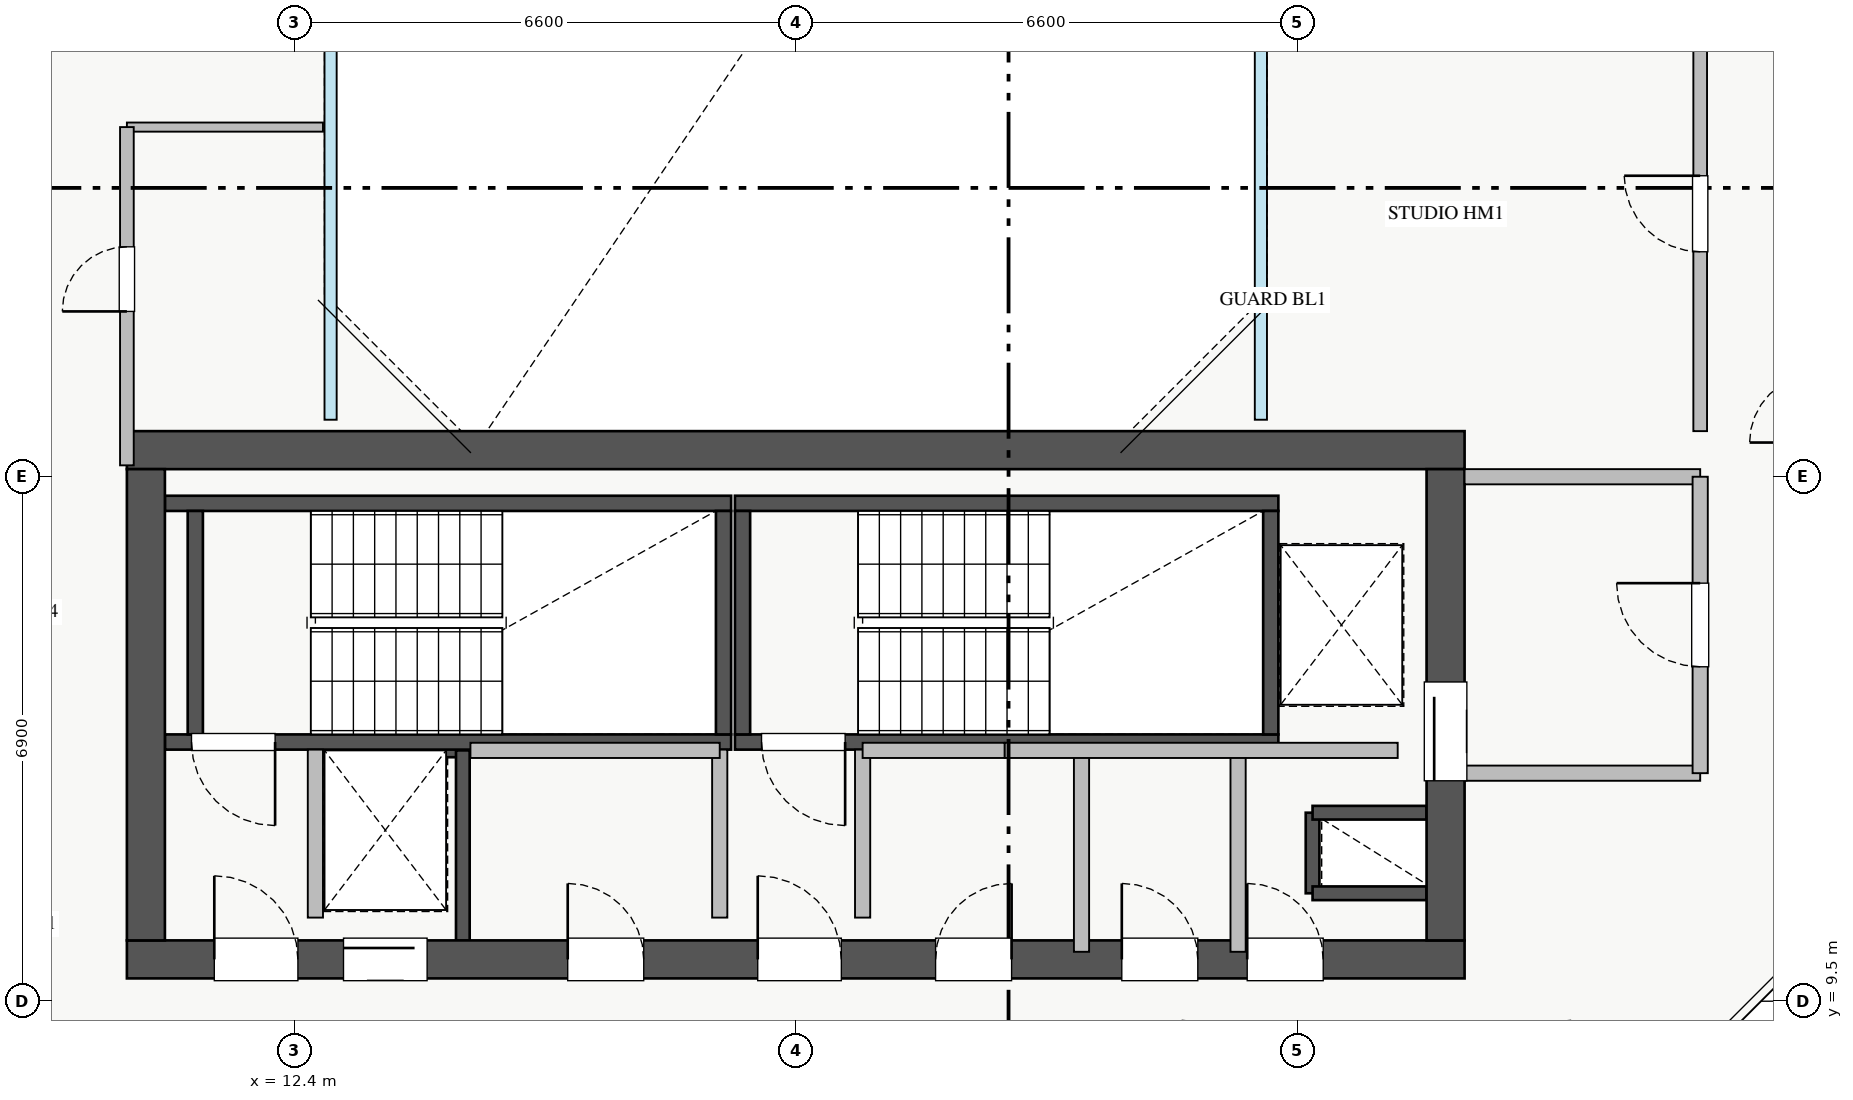
"""IFC4 building model, lengths in metres.
Left out: names, types, materials, properties, quantities, classifications, styles, units other than length and angle.
Written with IfcOpenShell. Run it as: python <this file> out.ifc"""

import sys

from ifc_helpers import new_model, si_unit, direction, frame, frame_2d, origin, place, context, subcontext, project, spatial, rectangle, extrude, source, transform, mapped, element, fill, save


model = new_model("IFC4")
c1 = context("Model", 3, precision=1e-05, world=origin(), true_north=direction((0.0, 1.0)))
c2 = subcontext(c1, "Body", "Model", "MODEL_VIEW")
j1 = project(units=[si_unit("LENGTHUNIT", "METRE"), si_unit("PLANEANGLEUNIT", "RADIAN")], contexts=[c1])
p1 = place(None, origin())
s1 = spatial("IfcSite", under=j1, at=p1, CompositionType="ELEMENT")
p2 = place(p1, origin())
s2 = spatial("IfcBuilding", under=s1, at=p2, CompositionType="ELEMENT")
p3 = place(p2, frame((0.0, 0.0, 190.5)))
s3 = spatial("IfcBuildingStorey", under=s2, at=p3, CompositionType="ELEMENT", Elevation=190.5)
p4 = place(p3, frame((12.68, 12.8, 0.0), z_axis=(0.0, 0.0, 1.0), x_axis=(1.0, 0.0, 0.0)))
e1 = element("IfcWall", 1, at=p4, inside=s3, PredefinedType="SHEAR", context=c2, shape_type="SweptSolid", body=[
    extrude(rectangle(XDim=1.94, YDim=0.18, at=frame_2d((0.97, 0.0))), origin(), (0.0, 0.0, 1.0), 3.07),
])
p5 = place(p3, frame((14.62, 10.3, 0.0), z_axis=(0.0, 0.0, 1.0), x_axis=(0.0, 1.0, 0.0)))
e2 = element("IfcWall", 2, at=p5, inside=s3, PredefinedType="SHEAR", context=c2, shape_type="SweptSolid", body=[
    extrude(rectangle(XDim=2.5, YDim=0.18, at=frame_2d((1.25, 0.0))), origin(), (0.0, 0.0, 1.0), 3.07),
])
p6 = place(p3, frame((25.8, 10.92, 0.0), z_axis=(0.0, 0.0, 1.0), x_axis=(0.0, 1.0, 0.0)))
e3 = element("IfcWall", 3, at=p6, inside=s3, PredefinedType="SHEAR", context=c2, shape_type="SweptSolid", body=[
    extrude(rectangle(XDim=1.06, YDim=0.18, at=frame_2d((0.53, 0.0))), origin(), (0.0, 0.0, 1.0), 3.07),
])
for number, where, z_axis, x_axis in (
    (4, (25.8, 11.98, 0.0), (0.0, 0.0, 1.0), (1.0, 0.0, 0.0)),
    (5, (25.8, 10.92, 0.0), (0.0, 0.0, 1.0), (1.0, 0.0, 0.0)),
):
    element("IfcWall", number, at=place(p3, frame(where, z_axis=z_axis, x_axis=x_axis)), inside=s3, PredefinedType="SHEAR", context=c2, shape_type="SweptSolid", body=[
        extrude(rectangle(XDim=1.5, YDim=0.18, at=frame_2d((0.75, 0.0))), origin(), (0.0, 0.0, 1.0), 3.07),
    ])
p7 = place(p3, frame((10.7, 12.91, 0.0), z_axis=(0.0, 0.0, 1.0), x_axis=(1.0, 0.0, 0.0)))
e6 = element("IfcWall", 6, at=p7, inside=s3, PredefinedType="SHEAR", context=c2, shape_type="SweptSolid", body=[
    extrude(rectangle(XDim=7.45, YDim=0.2, at=frame_2d((3.725, 0.0))), origin(), (0.0, 0.0, 1.0), 3.25),
])
p8 = place(p7, frame((0.35, 0.0, 0.0)))
e7 = element("IfcOpeningElement", 7, at=p8, cuts=e6, PredefinedType="OPENING", context=c2, shape_type="SweptSolid", body=[
    extrude(rectangle(XDim=1.1, YDim=2.05, at=frame_2d((0.55, 1.025))), frame((0.0, 0.11, 0.0), z_axis=(0.0, -1.0, 0.0), x_axis=(1.0, 0.0, 0.0)), (0.0, 0.0, 1.0), 0.22),
])
p9 = place(p3, frame((10.7, 16.05, 0.0), z_axis=(0.0, 0.0, 1.0), x_axis=(1.0, 0.0, 0.0)))
e8 = element("IfcWall", 8, at=p9, inside=s3, PredefinedType="SHEAR", context=c2, shape_type="SweptSolid", body=[
    extrude(rectangle(XDim=7.45, YDim=0.2, at=frame_2d((3.725, 0.0))), origin(), (0.0, 0.0, 1.0), 3.25),
])
for number, where, z_axis, x_axis in (
    (9, (11.1, 13.01, 0.0), (0.0, 0.0, 1.0), (0.0, 1.0, 0.0)),
    (10, (18.05, 13.01, 0.0), (0.0, 0.0, 1.0), (0.0, 1.0, 0.0)),
):
    element("IfcWall", number, at=place(p3, frame(where, z_axis=z_axis, x_axis=x_axis)), inside=s3, PredefinedType="SHEAR", context=c2, shape_type="SweptSolid", body=[
        extrude(rectangle(XDim=2.94, YDim=0.2, at=frame_2d((1.47, 0.0))), origin(), (0.0, 0.0, 1.0), 3.25),
    ])
p10 = place(p3, frame((18.2, 12.91, 0.0), z_axis=(0.0, 0.0, 1.0), x_axis=(1.0, 0.0, 0.0)))
e11 = element("IfcWall", 11, at=p10, inside=s3, PredefinedType="SHEAR", context=c2, shape_type="SweptSolid", body=[
    extrude(rectangle(XDim=7.15, YDim=0.2, at=frame_2d((3.575, 0.0))), origin(), (0.0, 0.0, 1.0), 3.25),
])
p11 = place(p10, frame((0.35, 0.0, 0.0)))
e12 = element("IfcOpeningElement", 12, at=p11, cuts=e11, PredefinedType="OPENING", context=c2, shape_type="SweptSolid", body=[
    extrude(rectangle(XDim=1.1, YDim=2.05, at=frame_2d((0.55, 1.025))), frame((0.0, 0.11, 0.0), z_axis=(0.0, -1.0, 0.0), x_axis=(1.0, 0.0, 0.0)), (0.0, 0.0, 1.0), 0.22),
])
p12 = place(p3, frame((18.2, 16.05, 0.0), z_axis=(0.0, 0.0, 1.0), x_axis=(1.0, 0.0, 0.0)))
e13 = element("IfcWall", 13, at=p12, inside=s3, PredefinedType="SHEAR", context=c2, shape_type="SweptSolid", body=[
    extrude(rectangle(XDim=7.15, YDim=0.2, at=frame_2d((3.575, 0.0))), origin(), (0.0, 0.0, 1.0), 3.25),
])
for number, where, z_axis, x_axis in (
    (14, (18.3, 13.01, 0.0), (0.0, 0.0, 1.0), (0.0, 1.0, 0.0)),
    (15, (25.25, 13.01, 0.0), (0.0, 0.0, 1.0), (0.0, 1.0, 0.0)),
):
    element("IfcWall", number, at=place(p3, frame(where, z_axis=z_axis, x_axis=x_axis)), inside=s3, PredefinedType="SHEAR", context=c2, shape_type="SweptSolid", body=[
        extrude(rectangle(XDim=2.94, YDim=0.2, at=frame_2d((1.47, 0.0))), origin(), (0.0, 0.0, 1.0), 3.25),
    ])
p13 = place(p3, frame((10.2, 10.05, 0.0), z_axis=(0.0, 0.0, 1.0), x_axis=(1.0, 0.0, 0.0)))
e16 = element("IfcWall", 16, at=p13, inside=s3, PredefinedType="SHEAR", context=c2, shape_type="SweptSolid", body=[
    extrude(rectangle(XDim=17.6, YDim=0.5, at=frame_2d((8.8, 0.0))), origin(), (0.0, 0.0, 1.0), 3.25),
])
p14 = place(p13, frame((1.15, 0.0, 0.0)))
e17 = element("IfcOpeningElement", 17, at=p14, cuts=e16, PredefinedType="OPENING", context=c2, shape_type="SweptSolid", body=[
    extrude(rectangle(XDim=1.1, YDim=2.05, at=frame_2d((0.55, 1.025))), frame((0.0, 0.26, 0.0), z_axis=(0.0, -1.0, 0.0), x_axis=(1.0, 0.0, 0.0)), (0.0, 0.0, 1.0), 0.52),
])
p15 = place(p13, frame((8.3, 0.0, 0.0)))
e18 = element("IfcOpeningElement", 18, at=p15, cuts=e16, PredefinedType="OPENING", context=c2, shape_type="SweptSolid", body=[
    extrude(rectangle(XDim=1.1, YDim=2.05, at=frame_2d((0.55, 1.025))), frame((0.0, 0.26, 0.0), z_axis=(0.0, -1.0, 0.0), x_axis=(1.0, 0.0, 0.0)), (0.0, 0.0, 1.0), 0.52),
])
p16 = place(p13, frame((2.85, 0.0, 0.0)))
e19 = element("IfcOpeningElement", 19, at=p16, cuts=e16, PredefinedType="OPENING", context=c2, shape_type="SweptSolid", body=[
    extrude(rectangle(XDim=1.1, YDim=2.05, at=frame_2d((0.55, 1.025))), frame((0.0, 0.26, 0.0), z_axis=(0.0, -1.0, 0.0), x_axis=(1.0, 0.0, 0.0)), (0.0, 0.0, 1.0), 0.52),
])
p17 = place(p13, frame((5.8, 0.0, 0.0)))
e20 = element("IfcOpeningElement", 20, at=p17, cuts=e16, PredefinedType="OPENING", context=c2, shape_type="SweptSolid", body=[
    extrude(rectangle(XDim=1.0, YDim=2.05, at=frame_2d((0.5, 1.025))), frame((0.0, 0.26, 0.0), z_axis=(0.0, -1.0, 0.0), x_axis=(1.0, 0.0, 0.0)), (0.0, 0.0, 1.0), 0.52),
])
p18 = place(p13, frame((14.74, 0.0, 0.0)))
e21 = element("IfcOpeningElement", 21, at=p18, cuts=e16, PredefinedType="OPENING", context=c2, shape_type="SweptSolid", body=[
    extrude(rectangle(XDim=1.0, YDim=2.05, at=frame_2d((0.5, 1.025))), frame((0.0, 0.26, 0.0), z_axis=(0.0, -1.0, 0.0), x_axis=(1.0, 0.0, 0.0)), (0.0, 0.0, 1.0), 0.52),
])
p19 = place(p13, frame((10.64, 0.0, 0.0)))
e22 = element("IfcOpeningElement", 22, at=p19, cuts=e16, PredefinedType="OPENING", context=c2, shape_type="SweptSolid", body=[
    extrude(rectangle(XDim=1.0, YDim=2.05, at=frame_2d((0.5, 1.025))), frame((0.0, 0.26, 0.0), z_axis=(0.0, -1.0, 0.0), x_axis=(1.0, 0.0, 0.0)), (0.0, 0.0, 1.0), 0.52),
])
p20 = place(p13, frame((13.09, 0.0, 0.0)))
e23 = element("IfcOpeningElement", 23, at=p20, cuts=e16, PredefinedType="OPENING", context=c2, shape_type="SweptSolid", body=[
    extrude(rectangle(XDim=1.0, YDim=2.05, at=frame_2d((0.5, 1.025))), frame((0.0, 0.26, 0.0), z_axis=(0.0, -1.0, 0.0), x_axis=(1.0, 0.0, 0.0)), (0.0, 0.0, 1.0), 0.52),
])
p21 = place(p3, frame((10.2, 16.75, 0.0), z_axis=(0.0, 0.0, 1.0), x_axis=(1.0, 0.0, 0.0)))
e24 = element("IfcWall", 24, at=p21, inside=s3, PredefinedType="SHEAR", context=c2, shape_type="SweptSolid", body=[
    extrude(rectangle(XDim=17.6, YDim=0.5, at=frame_2d((8.8, 0.0))), origin(), (0.0, 0.0, 1.0), 3.25),
])
p22 = place(p3, frame((10.45, 10.3, 0.0), z_axis=(0.0, 0.0, 1.0), x_axis=(0.0, 1.0, 0.0)))
e25 = element("IfcWall", 25, at=p22, inside=s3, PredefinedType="SHEAR", context=c2, shape_type="SweptSolid", body=[
    extrude(rectangle(XDim=6.2, YDim=0.5, at=frame_2d((3.1, 0.0))), origin(), (0.0, 0.0, 1.0), 3.25),
])
p23 = place(p3, frame((27.55, 10.3, 0.0), z_axis=(0.0, 0.0, 1.0), x_axis=(0.0, 1.0, 0.0)))
e26 = element("IfcWall", 26, at=p23, inside=s3, PredefinedType="SHEAR", context=c2, shape_type="SweptSolid", body=[
    extrude(rectangle(XDim=6.2, YDim=0.5, at=frame_2d((3.1, 0.0))), origin(), (0.0, 0.0, 1.0), 3.25),
])
p24 = place(p23, frame((2.1, 0.0, 0.0)))
e27 = element("IfcOpeningElement", 27, at=p24, cuts=e26, PredefinedType="OPENING", context=c2, shape_type="SweptSolid", body=[
    extrude(rectangle(XDim=1.3, YDim=2.05, at=frame_2d((0.65, 1.025))), frame((0.0, 0.26, 0.0), z_axis=(0.0, -1.0, 0.0), x_axis=(1.0, 0.0, 0.0)), (0.0, 0.0, 1.0), 0.52),
])
p25 = place(p3, frame((27.8, 16.4, 0.0), z_axis=(0.0, 0.0, 1.0), x_axis=(1.0, 0.0, 0.0)))
e28 = element("IfcWall", 28, at=p25, inside=s3, PredefinedType="PARTITIONING", context=c2, shape_type="SweptSolid", body=[
    extrude(rectangle(XDim=3.1, YDim=0.2, at=frame_2d((1.55, 0.0))), origin(), (0.0, 0.0, 1.0), 3.07),
])
p26 = place(p3, frame((27.8, 12.5, 0.0), z_axis=(0.0, 0.0, 1.0), x_axis=(1.0, 0.0, 0.0)))
e29 = element("IfcWall", 29, at=p26, inside=s3, PredefinedType="PARTITIONING", context=c2, shape_type="SweptSolid", body=[
    extrude(rectangle(XDim=3.1, YDim=0.2, at=frame_2d((1.55, 0.0))), origin(), (0.0, 0.0, 1.0), 2.265),
])
p27 = place(p3, frame((30.9, 12.5, 0.0), z_axis=(0.0, 0.0, 1.0), x_axis=(0.0, 1.0, 0.0)))
e30 = element("IfcWall", 30, at=p27, inside=s3, PredefinedType="PARTITIONING", context=c2, shape_type="SweptSolid", body=[
    extrude(rectangle(XDim=3.9, YDim=0.2, at=frame_2d((1.95, 0.0))), origin(), (0.0, 0.0, 1.0), 3.07),
])
p28 = place(p27, frame((1.4, 0.0, 0.0)))
e31 = element("IfcOpeningElement", 31, at=p28, cuts=e30, PredefinedType="OPENING", context=c2, shape_type="SweptSolid", body=[
    extrude(rectangle(XDim=1.1, YDim=2.05, at=frame_2d((0.55, 1.025))), frame((0.0, 0.11, 0.0), z_axis=(0.0, -1.0, 0.0), x_axis=(1.0, 0.0, 0.0)), (0.0, 0.0, 1.0), 0.22),
])
for number, where, z_axis, x_axis in (
    (32, (12.68, 10.6, 0.0), (0.0, 0.0, 1.0), (0.0, 1.0, 0.0)),
    (33, (18.0, 10.6, 0.0), (0.0, 0.0, 1.0), (0.0, 1.0, 0.0)),
    (34, (19.88, 10.6, 0.0), (0.0, 0.0, 1.0), (0.0, 1.0, 0.0)),
):
    element("IfcWall", number, at=place(p3, frame(where, z_axis=z_axis, x_axis=x_axis)), inside=s3, PredefinedType="PARTITIONING", context=c2, shape_type="SweptSolid", body=[
        extrude(rectangle(XDim=2.21, YDim=0.2, at=frame_2d((1.105, 0.0))), origin(), (0.0, 0.0, 1.0), 3.07),
    ])
p29 = place(p3, frame((14.72, 12.8, 0.0), z_axis=(0.0, 0.0, 1.0), x_axis=(1.0, 0.0, 0.0)))
e35 = element("IfcWall", 35, at=p29, inside=s3, PredefinedType="PARTITIONING", context=c2, shape_type="SweptSolid", body=[
    extrude(rectangle(XDim=3.28, YDim=0.2, at=frame_2d((1.64, 0.0))), origin(), (0.0, 0.0, 1.0), 3.07),
])
p30 = place(p3, frame((24.82, 10.15, 0.0), z_axis=(0.0, 0.0, 1.0), x_axis=(0.0, 1.0, 0.0)))
e36 = element("IfcWall", 36, at=p30, inside=s3, PredefinedType="PARTITIONING", context=c2, shape_type="SweptSolid", body=[
    extrude(rectangle(XDim=2.65, YDim=0.2, at=frame_2d((1.325, 0.0))), origin(), (0.0, 0.0, 1.0), 3.07),
])
p31 = place(p3, frame((19.88, 12.8, 0.0), z_axis=(0.0, 0.0, 1.0), x_axis=(1.0, 0.0, 0.0)))
e37 = element("IfcWall", 37, at=p31, inside=s3, PredefinedType="PARTITIONING", context=c2, shape_type="SweptSolid", body=[
    extrude(rectangle(XDim=1.87, YDim=0.2, at=frame_2d((0.935, 0.0))), origin(), (0.0, 0.0, 1.0), 3.07),
])
p32 = place(p3, frame((22.76, 10.15, 0.0), z_axis=(0.0, 0.0, 1.0), x_axis=(0.0, 1.0, 0.0)))
e38 = element("IfcWall", 38, at=p32, inside=s3, PredefinedType="PARTITIONING", context=c2, shape_type="SweptSolid", body=[
    extrude(rectangle(XDim=2.65, YDim=0.2, at=frame_2d((1.325, 0.0))), origin(), (0.0, 0.0, 1.0), 3.07),
])
p33 = place(p3, frame((21.75, 12.8, 0.0), z_axis=(0.0, 0.0, 1.0), x_axis=(1.0, 0.0, 0.0)))
e39 = element("IfcWall", 39, at=p33, inside=s3, PredefinedType="PARTITIONING", context=c2, shape_type="SweptSolid", body=[
    extrude(rectangle(XDim=5.17, YDim=0.2, at=frame_2d((2.585, 0.0))), origin(), (0.0, 0.0, 1.0), 3.07),
])
p34 = place(p3, frame((10.2, 21.0, 0.0), z_axis=(0.0, 0.0, 1.0), x_axis=(1.0, 0.0, 0.0)))
e40 = element("IfcWall", 40, at=p34, inside=s3, PredefinedType="PLUMBINGWALL", context=c2, shape_type="SweptSolid", body=[
    extrude(rectangle(XDim=2.58, YDim=0.12, at=frame_2d((1.29, 0.0))), origin(), (0.0, 0.0, 1.0), 3.07),
])
p35 = place(p3, frame((10.2, 16.55, 0.0), z_axis=(0.0, 0.0, 1.0), x_axis=(0.0, 1.0, 0.0)))
e41 = element("IfcWall", 41, at=p35, inside=s3, PredefinedType="PARTITIONING", context=c2, shape_type="SweptSolid", body=[
    extrude(rectangle(XDim=4.45, YDim=0.18, at=frame_2d((2.225, 0.0))), origin(), (0.0, 0.0, 1.0), 3.07),
])
p36 = place(p35, frame((2.025, 0.0, 0.0)))
e42 = element("IfcOpeningElement", 42, at=p36, cuts=e41, PredefinedType="OPENING", context=c2, shape_type="SweptSolid", body=[
    extrude(rectangle(XDim=0.85, YDim=2.05, at=frame_2d((0.425, 1.025))), frame((0.0, 0.1, 0.0), z_axis=(0.0, -1.0, 0.0), x_axis=(1.0, 0.0, 0.0)), (0.0, 0.0, 1.0), 0.2),
])
p37 = place(p3, frame((30.9, 17.0, 0.0), z_axis=(0.0, 0.0, 1.0), x_axis=(0.0, 1.0, 0.0)))
e43 = element("IfcWall", 43, at=p37, inside=s3, PredefinedType="PARTITIONING", context=c2, shape_type="SweptSolid", body=[
    extrude(rectangle(XDim=12.0, YDim=0.18, at=frame_2d((6.0, 0.0))), origin(), (0.0, 0.0, 1.0), 3.07),
])
p38 = place(p37, frame((2.36, 0.0, 0.0)))
e44 = element("IfcOpeningElement", 44, at=p38, cuts=e43, PredefinedType="OPENING", context=c2, shape_type="SweptSolid", body=[
    extrude(rectangle(XDim=1.0, YDim=2.05, at=frame_2d((0.5, 1.025))), frame((0.0, 0.1, 0.0), z_axis=(0.0, -1.0, 0.0), x_axis=(1.0, 0.0, 0.0)), (0.0, 0.0, 1.0), 0.2),
])
m1 = source(origin(), c2, "Body", "SweptSolid", [
    extrude(rectangle(XDim=1.3, YDim=2.05, at=frame_2d((0.65, 1.025))), frame((0.0, 0.025, 0.0), z_axis=(0.0, -1.0, 0.0), x_axis=(1.0, 0.0, 0.0)), (0.0, 0.0, 1.0), 0.05),
])
p39 = place(p24, origin())
e45 = element("IfcDoor", 45, at=p39, inside=s3, OperationType="SLIDING_TO_RIGHT", PredefinedType="DOOR", context=c2, shape_type="MappedRepresentation", body=[
    mapped(m1, transform((0.0, 0.0, 0.0), x_axis=(1.0, 0.0, 0.0), y_axis=(0.0, 1.0, 0.0), z_axis=(0.0, 0.0, 1.0), scale=1.0)),
])
fill(e27, e45)
m2 = source(origin(), c2, "Body", "SweptSolid", [
    extrude(rectangle(XDim=1.1, YDim=2.05, at=frame_2d((0.55, 1.025))), frame((0.0, 0.025, 0.0), z_axis=(0.0, -1.0, 0.0), x_axis=(1.0, 0.0, 0.0)), (0.0, 0.0, 1.0), 0.05),
])
p40 = place(p14, origin())
e46 = element("IfcDoor", 46, at=p40, inside=s3, OperationType="SINGLE_SWING_LEFT", PredefinedType="DOOR", context=c2, shape_type="MappedRepresentation", body=[
    mapped(m2, transform((0.0, 0.0, 0.0), x_axis=(1.0, 0.0, 0.0), y_axis=(0.0, 1.0, 0.0), z_axis=(0.0, 0.0, 1.0), scale=1.0)),
])
fill(e17, e46)
p41 = place(p8, frame((1.1, 0.0, 0.0), z_axis=(0.0, 0.0, 1.0), x_axis=(-1.0, 0.0, 0.0)))
e47 = element("IfcDoor", 47, at=p41, inside=s3, OperationType="SINGLE_SWING_RIGHT", PredefinedType="DOOR", context=c2, shape_type="MappedRepresentation", body=[
    mapped(m2, transform((0.0, 0.0, 0.0), x_axis=(1.0, 0.0, 0.0), y_axis=(0.0, 1.0, 0.0), z_axis=(0.0, 0.0, 1.0), scale=1.0)),
])
fill(e7, e47)
p42 = place(p15, origin())
e48 = element("IfcDoor", 48, at=p42, inside=s3, OperationType="SINGLE_SWING_LEFT", PredefinedType="DOOR", context=c2, shape_type="MappedRepresentation", body=[
    mapped(m2, transform((0.0, 0.0, 0.0), x_axis=(1.0, 0.0, 0.0), y_axis=(0.0, 1.0, 0.0), z_axis=(0.0, 0.0, 1.0), scale=1.0)),
])
fill(e18, e48)
p43 = place(p11, frame((1.1, 0.0, 0.0), z_axis=(0.0, 0.0, 1.0), x_axis=(-1.0, 0.0, 0.0)))
e49 = element("IfcDoor", 49, at=p43, inside=s3, OperationType="SINGLE_SWING_RIGHT", PredefinedType="DOOR", context=c2, shape_type="MappedRepresentation", body=[
    mapped(m2, transform((0.0, 0.0, 0.0), x_axis=(1.0, 0.0, 0.0), y_axis=(0.0, 1.0, 0.0), z_axis=(0.0, 0.0, 1.0), scale=1.0)),
])
fill(e12, e49)
p44 = place(p16, origin())
e50 = element("IfcDoor", 50, at=p44, inside=s3, OperationType="SLIDING_TO_RIGHT", PredefinedType="DOOR", context=c2, shape_type="MappedRepresentation", body=[
    mapped(m2, transform((0.0, 0.0, 0.0), x_axis=(1.0, 0.0, 0.0), y_axis=(0.0, 1.0, 0.0), z_axis=(0.0, 0.0, 1.0), scale=1.0)),
])
fill(e19, e50)
m3 = source(origin(), c2, "Body", "SweptSolid", [
    extrude(rectangle(XDim=1.0, YDim=2.05, at=frame_2d((0.5, 1.025))), frame((0.0, 0.025, 0.0), z_axis=(0.0, -1.0, 0.0), x_axis=(1.0, 0.0, 0.0)), (0.0, 0.0, 1.0), 0.05),
])
p45 = place(p17, origin())
e51 = element("IfcDoor", 51, at=p45, inside=s3, OperationType="SINGLE_SWING_LEFT", PredefinedType="DOOR", context=c2, shape_type="MappedRepresentation", body=[
    mapped(m3, transform((0.0, 0.0, 0.0), x_axis=(1.0, 0.0, 0.0), y_axis=(0.0, 1.0, 0.0), z_axis=(0.0, 0.0, 1.0), scale=1.0)),
])
fill(e20, e51)
p46 = place(p18, origin())
e52 = element("IfcDoor", 52, at=p46, inside=s3, OperationType="SINGLE_SWING_LEFT", PredefinedType="DOOR", context=c2, shape_type="MappedRepresentation", body=[
    mapped(m3, transform((0.0, 0.0, 0.0), x_axis=(1.0, 0.0, 0.0), y_axis=(0.0, 1.0, 0.0), z_axis=(0.0, 0.0, 1.0), scale=1.0)),
])
fill(e21, e52)
p47 = place(p19, origin())
e53 = element("IfcDoor", 53, at=p47, inside=s3, OperationType="SINGLE_SWING_RIGHT", PredefinedType="DOOR", context=c2, shape_type="MappedRepresentation", body=[
    mapped(m3, transform((0.0, 0.0, 0.0), x_axis=(1.0, 0.0, 0.0), y_axis=(0.0, 1.0, 0.0), z_axis=(0.0, 0.0, 1.0), scale=1.0)),
])
fill(e22, e53)
p48 = place(p20, origin())
e54 = element("IfcDoor", 54, at=p48, inside=s3, OperationType="SINGLE_SWING_LEFT", PredefinedType="DOOR", context=c2, shape_type="MappedRepresentation", body=[
    mapped(m3, transform((0.0, 0.0, 0.0), x_axis=(1.0, 0.0, 0.0), y_axis=(0.0, 1.0, 0.0), z_axis=(0.0, 0.0, 1.0), scale=1.0)),
])
fill(e23, e54)
p49 = place(p28, origin())
e55 = element("IfcDoor", 55, at=p49, inside=s3, OperationType="SINGLE_SWING_RIGHT", PredefinedType="DOOR", context=c2, shape_type="MappedRepresentation", body=[
    mapped(m2, transform((0.0, 0.0, 0.0), x_axis=(1.0, 0.0, 0.0), y_axis=(0.0, 1.0, 0.0), z_axis=(0.0, 0.0, 1.0), scale=1.0)),
])
fill(e31, e55)
m4 = source(origin(), c2, "Body", "SweptSolid", [
    extrude(rectangle(XDim=0.85, YDim=2.05, at=frame_2d((0.425, 1.025))), frame((0.0, 0.025, 0.0), z_axis=(0.0, -1.0, 0.0), x_axis=(1.0, 0.0, 0.0)), (0.0, 0.0, 1.0), 0.05),
])
p50 = place(p36, origin())
e56 = element("IfcDoor", 56, at=p50, inside=s3, OperationType="SINGLE_SWING_LEFT", PredefinedType="DOOR", context=c2, shape_type="MappedRepresentation", body=[
    mapped(m4, transform((0.0, 0.0, 0.0), x_axis=(1.0, 0.0, 0.0), y_axis=(0.0, 1.0, 0.0), z_axis=(0.0, 0.0, 1.0), scale=1.0)),
])
fill(e42, e56)
p51 = place(p38, origin())
e57 = element("IfcDoor", 57, at=p51, inside=s3, OperationType="SINGLE_SWING_RIGHT", PredefinedType="DOOR", context=c2, shape_type="MappedRepresentation", body=[
    mapped(m3, transform((0.0, 0.0, 0.0), x_axis=(1.0, 0.0, 0.0), y_axis=(0.0, 1.0, 0.0), z_axis=(0.0, 0.0, 1.0), scale=1.0)),
])
fill(e44, e57)
save(model, sys.argv[1])
